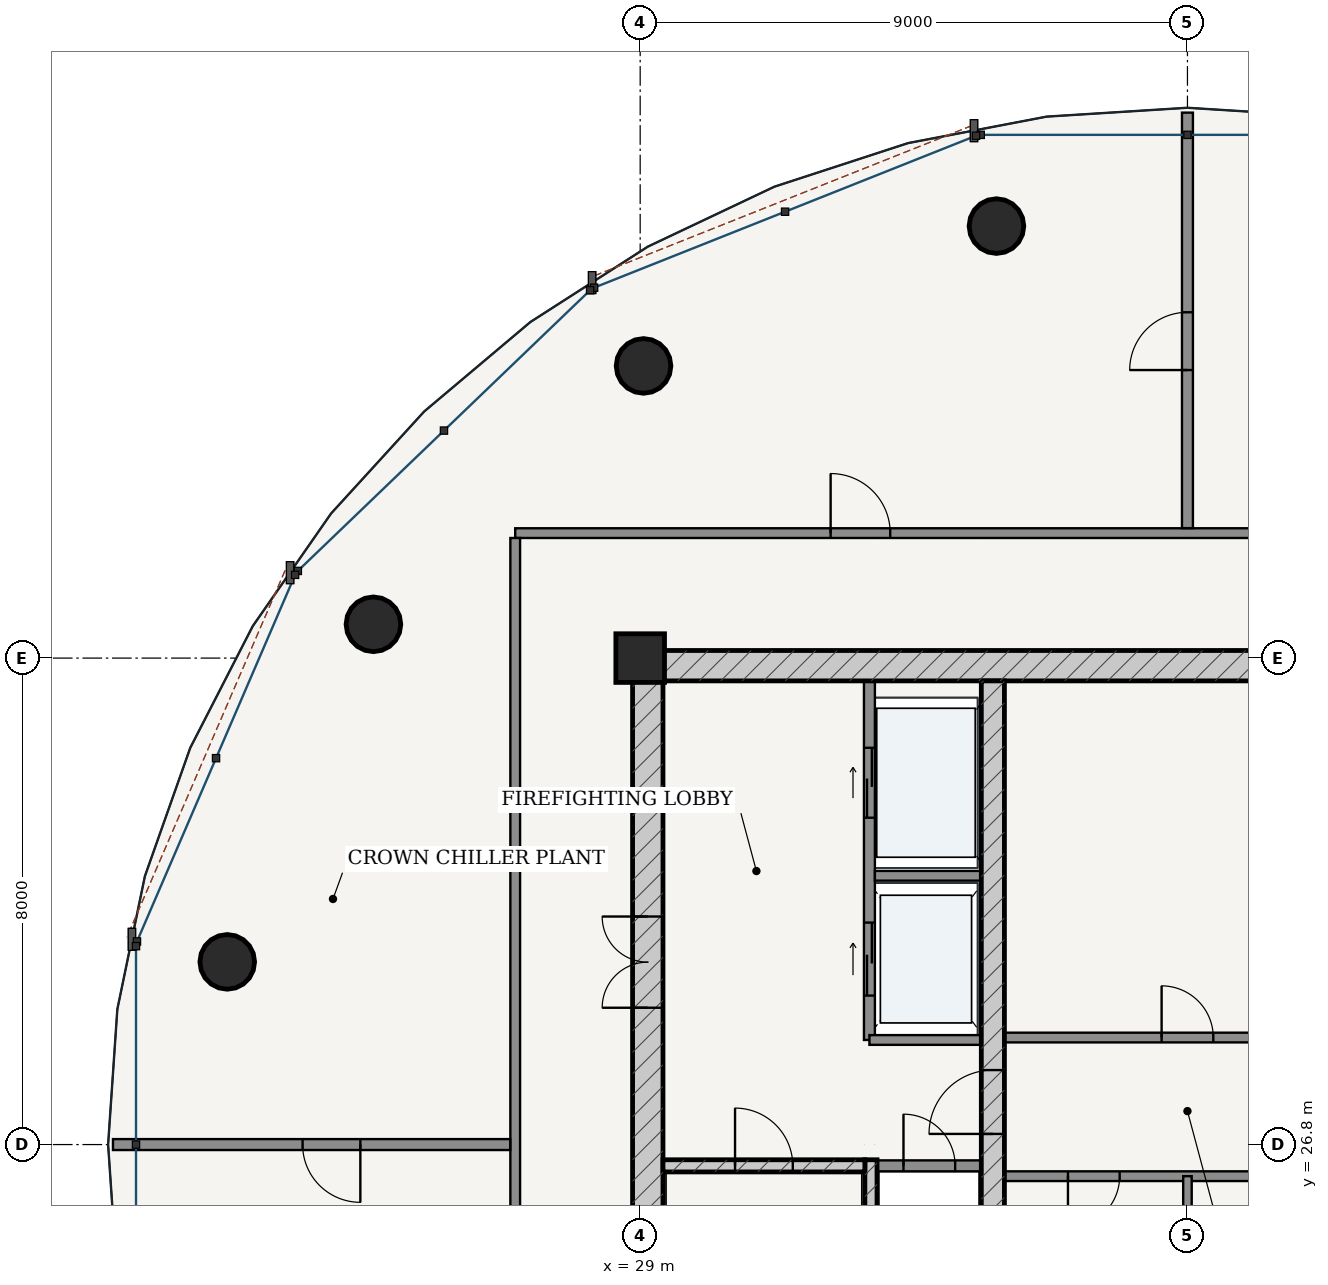
"""IFC4 building model, lengths in metres.
Left out: names, types, materials, properties, quantities, classifications, styles, units other than length and angle.
Written with IfcOpenShell. Run it as: python <this file> out.ifc"""

import sys

from ifc_helpers import new_model, si_unit, direction, frame, frame_2d, origin, origin_2d, place, context, subcontext, project, spatial, rectangle, hollow_circle, extrude, source, transform, mapped, element, fill, save


model = new_model("IFC4")
c1 = context("Model", 3, precision=1e-05, world=origin(), true_north=direction((-0.2419218956, 0.970295726276)))
c2 = subcontext(c1, "Body", "Model", "MODEL_VIEW")
j1 = project(units=[si_unit("LENGTHUNIT", "METRE"), si_unit("PLANEANGLEUNIT", "RADIAN")], contexts=[c1])
p1 = place(None, origin())
s1 = spatial("IfcSite", under=j1, at=p1, CompositionType="ELEMENT")
p2 = place(p1, origin())
s2 = spatial("IfcBuilding", under=s1, at=p2, CompositionType="ELEMENT")
p3 = place(p2, frame((0.0, 0.0, 311.3)))
s3 = spatial("IfcBuildingStorey", under=s2, at=p3, CompositionType="ELEMENT", Elevation=311.3)
p4 = place(p3, frame((29.0, 34.8, 0.0), z_axis=(0.0, 0.0, 1.0), x_axis=(1.0, 0.0, 0.0)))
e1 = element("IfcColumn", 1, at=p4, inside=s3, PredefinedType="COLUMN", context=c2, shape_type="SweptSolid", body=[
    extrude(rectangle(XDim=0.8, YDim=0.8, at=origin_2d()), origin(), (0.0, 0.0, 1.0), 5.2),
])
p5 = place(p3, frame((28.875, 34.675, 0.0), z_axis=(0.0, 0.0, 1.0), x_axis=(1.0, 0.0, 0.0)))
e2 = element("IfcWall", 2, at=p5, inside=s3, PredefinedType="SHEAR", context=c2, shape_type="SweptSolid", body=[
    extrude(rectangle(XDim=18.25, YDim=0.5, at=frame_2d((9.125, 0.0))), origin(), (0.0, 0.0, 1.0), 4.78),
])
p6 = place(p3, frame((29.125, 19.175, 0.0), z_axis=(0.0, 0.0, 1.0), x_axis=(0.0, 1.0, 0.0)))
e3 = element("IfcWall", 3, at=p6, inside=s3, PredefinedType="SHEAR", context=c2, shape_type="SweptSolid", body=[
    extrude(rectangle(XDim=15.25, YDim=0.5, at=frame_2d((7.625, 0.0))), origin(), (0.0, 0.0, 1.0), 4.78),
])
p7 = place(p6, frame((9.875, 0.0, 0.0)))
e4 = element("IfcOpeningElement", 4, at=p7, cuts=e3, PredefinedType="OPENING", context=c2, shape_type="SweptSolid", body=[
    extrude(rectangle(XDim=1.5, YDim=2.2, at=frame_2d((0.75, 1.1))), frame((0.0, 0.26, 0.0), z_axis=(0.0, -1.0, 0.0), x_axis=(1.0, 0.0, 0.0)), (0.0, 0.0, 1.0), 0.52),
])
p8 = place(p3, frame((32.795, 19.175, 0.0), z_axis=(0.0, 0.0, 1.0), x_axis=(0.0, 1.0, 0.0)))
e5 = element("IfcWall", 5, at=p8, inside=s3, PredefinedType="SOLIDWALL", context=c2, shape_type="SweptSolid", body=[
    extrude(rectangle(XDim=7.375, YDim=0.2, at=frame_2d((3.688, 0.0))), origin(), (0.0, 0.0, 1.0), 4.78),
])
p9 = place(p3, frame((29.375, 26.45, 0.0), z_axis=(0.0, 0.0, 1.0), x_axis=(1.0, 0.0, 0.0)))
e6 = element("IfcWall", 6, at=p9, inside=s3, PredefinedType="SOLIDWALL", context=c2, shape_type="SweptSolid", body=[
    extrude(rectangle(XDim=3.32, YDim=0.2, at=frame_2d((1.66, 0.0))), origin(), (0.0, 0.0, 1.0), 4.78),
])
p10 = place(p9, frame((1.185, 0.0, 0.0)))
e7 = element("IfcOpeningElement", 7, at=p10, cuts=e6, PredefinedType="OPENING", context=c2, shape_type="SweptSolid", body=[
    extrude(rectangle(XDim=0.95, YDim=2.15, at=frame_2d((0.475, 1.075))), frame((0.0, 0.11, 0.0), z_axis=(0.0, -1.0, 0.0), x_axis=(1.0, 0.0, 0.0)), (0.0, 0.0, 1.0), 0.22),
])
p11 = place(p3, frame((34.8, 19.175, 0.0), z_axis=(0.0, 0.0, 1.0), x_axis=(0.0, 1.0, 0.0)))
e8 = element("IfcWall", 8, at=p11, inside=s3, PredefinedType="SHEAR", context=c2, shape_type="SweptSolid", body=[
    extrude(rectangle(XDim=15.25, YDim=0.38, at=frame_2d((7.625, 0.0))), origin(), (0.0, 0.0, 1.0), 4.78),
])
p12 = place(p11, frame((7.8, 0.0, 0.0)))
e9 = element("IfcOpeningElement", 9, at=p12, cuts=e8, PredefinedType="OPENING", context=c2, shape_type="SweptSolid", body=[
    extrude(rectangle(XDim=1.05, YDim=2.15, at=frame_2d((0.525, 1.075))), frame((0.0, 0.2, 0.0), z_axis=(0.0, -1.0, 0.0), x_axis=(1.0, 0.0, 0.0)), (0.0, 0.0, 1.0), 0.4),
])
for number, where, z_axis, x_axis in (
    (10, (34.859, 41.904, 0.0), (0.0, 0.0, 1.0), (1.0, 0.0, 0.0)),
    (11, (29.055, 39.605, 0.0), (0.0, 0.0, 1.0), (1.0, 0.0, 0.0)),
    (12, (24.613, 35.356, 0.0), (0.0, 0.0, 1.0), (1.0, 0.0, 0.0)),
    (13, (22.209, 29.804, 0.0), (0.0, 0.0, 1.0), (1.0, 0.0, 0.0)),
):
    element("IfcColumn", number, at=place(p3, frame(where, z_axis=z_axis, x_axis=x_axis)), inside=s3, PredefinedType="COLUMN", context=c2, shape_type="SweptSolid", body=[
        extrude(hollow_circle(Radius=0.45, WallThickness=0.032, at=origin_2d()), origin(), (0.0, 0.0, 1.0), 5.2),
    ])
p13 = place(p3, frame((32.9, 26.45, 0.0), z_axis=(0.0, 0.0, 1.0), x_axis=(1.0, 0.0, 0.0)))
e14 = element("IfcWall", 14, at=p13, inside=s3, PredefinedType="PARTITIONING", context=c2, shape_type="SweptSolid", body=[
    extrude(rectangle(XDim=1.71, YDim=0.18, at=frame_2d((0.855, 0.0))), origin(), (0.0, 0.0, 1.0), 4.78),
])
p14 = place(p13, frame((0.43, 0.0, 0.0)))
e15 = element("IfcOpeningElement", 15, at=p14, cuts=e14, PredefinedType="OPENING", context=c2, shape_type="SweptSolid", body=[
    extrude(rectangle(XDim=0.85, YDim=2.1, at=frame_2d((0.425, 1.05))), frame((0.0, 0.1, 0.0), z_axis=(0.0, -1.0, 0.0), x_axis=(1.0, 0.0, 0.0)), (0.0, 0.0, 1.0), 0.2),
])
p15 = place(p3, frame((32.77, 28.52, 0.0), z_axis=(0.0, 0.0, 1.0), x_axis=(0.0, 1.0, 0.0)))
e16 = element("IfcWall", 16, at=p15, inside=s3, PredefinedType="PARTITIONING", context=c2, shape_type="SweptSolid", body=[
    extrude(rectangle(XDim=5.905, YDim=0.18, at=frame_2d((2.953, 0.0))), origin(), (0.0, 0.0, 1.0), 4.78),
])
p16 = place(p15, frame((3.655, 0.0, 0.0)))
e17 = element("IfcOpeningElement", 17, at=p16, cuts=e16, PredefinedType="OPENING", context=c2, shape_type="SweptSolid", body=[
    extrude(rectangle(XDim=1.15, YDim=2.2, at=frame_2d((0.575, 1.1))), frame((0.0, 0.1, 0.0), z_axis=(0.0, -1.0, 0.0), x_axis=(1.0, 0.0, 0.0)), (0.0, 0.0, 1.0), 0.2),
])
p17 = place(p15, frame((0.73, 0.0, 0.0)))
e18 = element("IfcOpeningElement", 18, at=p17, cuts=e16, PredefinedType="OPENING", context=c2, shape_type="SweptSolid", body=[
    extrude(rectangle(XDim=1.2, YDim=2.25, at=frame_2d((0.6, 1.125))), frame((0.0, 0.1, 0.0), z_axis=(0.0, -1.0, 0.0), x_axis=(1.0, 0.0, 0.0)), (0.0, 0.0, 1.0), 0.2),
])
p18 = place(p3, frame((32.86, 31.22, 0.0), z_axis=(0.0, 0.0, 1.0), x_axis=(1.0, 0.0, 0.0)))
e19 = element("IfcWall", 19, at=p18, inside=s3, PredefinedType="PARTITIONING", context=c2, shape_type="SweptSolid", body=[
    extrude(rectangle(XDim=1.75, YDim=0.16, at=frame_2d((0.875, 0.0))), origin(), (0.0, 0.0, 1.0), 4.78),
])
p19 = place(p3, frame((32.77, 28.52, 0.0), z_axis=(0.0, 0.0, 1.0), x_axis=(1.0, 0.0, 0.0)))
e20 = element("IfcWall", 20, at=p19, inside=s3, PredefinedType="PARTITIONING", context=c2, shape_type="SweptSolid", body=[
    extrude(rectangle(XDim=1.84, YDim=0.16, at=frame_2d((0.92, 0.0))), origin(), (0.0, 0.0, 1.0), 4.78),
])
p20 = place(p3, frame((34.99, 28.56, 0.0), z_axis=(0.0, 0.0, 1.0), x_axis=(1.0, 0.0, 0.0)))
e21 = element("IfcWall", 21, at=p20, inside=s3, PredefinedType="PARTITIONING", context=c2, shape_type="SweptSolid", body=[
    extrude(rectangle(XDim=6.02, YDim=0.16, at=frame_2d((3.01, 0.0))), origin(), (0.0, 0.0, 1.0), 4.78),
])
p21 = place(p20, frame((2.585, 0.0, 0.0)))
e22 = element("IfcOpeningElement", 22, at=p21, cuts=e21, PredefinedType="OPENING", context=c2, shape_type="SweptSolid", body=[
    extrude(rectangle(XDim=0.85, YDim=2.1, at=frame_2d((0.425, 1.05))), frame((0.0, 0.09, 0.0), z_axis=(0.0, -1.0, 0.0), x_axis=(1.0, 0.0, 0.0)), (0.0, 0.0, 1.0), 0.18),
])
p22 = place(p3, frame((34.99, 26.28, 0.0), z_axis=(0.0, 0.0, 1.0), x_axis=(1.0, 0.0, 0.0)))
e23 = element("IfcWall", 23, at=p22, inside=s3, PredefinedType="PARTITIONING", context=c2, shape_type="SweptSolid", body=[
    extrude(rectangle(XDim=6.02, YDim=0.16, at=frame_2d((3.01, 0.0))), origin(), (0.0, 0.0, 1.0), 4.78),
])
p23 = place(p22, frame((1.045, 0.0, 0.0)))
e24 = element("IfcOpeningElement", 24, at=p23, cuts=e23, PredefinedType="OPENING", context=c2, shape_type="SweptSolid", body=[
    extrude(rectangle(XDim=0.85, YDim=2.1, at=frame_2d((0.425, 1.05))), frame((0.0, 0.09, 0.0), z_axis=(0.0, -1.0, 0.0), x_axis=(1.0, 0.0, 0.0)), (0.0, 0.0, 1.0), 0.18),
])
p24 = place(p22, frame((4.125, 0.0, 0.0)))
e25 = element("IfcOpeningElement", 25, at=p24, cuts=e23, PredefinedType="OPENING", context=c2, shape_type="SweptSolid", body=[
    extrude(rectangle(XDim=0.85, YDim=2.1, at=frame_2d((0.425, 1.05))), frame((0.0, 0.09, 0.0), z_axis=(0.0, -1.0, 0.0), x_axis=(1.0, 0.0, 0.0)), (0.0, 0.0, 1.0), 0.18),
])
p25 = place(p3, frame((38.0, 23.72, 0.0), z_axis=(0.0, 0.0, 1.0), x_axis=(0.0, 1.0, 0.0)))
e26 = element("IfcWall", 26, at=p25, inside=s3, PredefinedType="PARTITIONING", context=c2, shape_type="SweptSolid", body=[
    extrude(rectangle(XDim=2.56, YDim=0.14, at=frame_2d((1.28, 0.0))), origin(), (0.0, 0.0, 1.0), 4.78),
])
p26 = place(p3, frame((26.945, 36.855, 0.0), z_axis=(0.0, 0.0, 1.0), x_axis=(1.0, 0.0, 0.0)))
e27 = element("IfcWall", 27, at=p26, inside=s3, PredefinedType="PARTITIONING", context=c2, shape_type="SweptSolid", body=[
    extrude(rectangle(XDim=22.11, YDim=0.16, at=frame_2d((11.055, 0.0))), origin(), (0.0, 0.0, 1.0), 4.352),
])
p27 = place(p26, frame((15.943, 0.0, 0.0)))
e28 = element("IfcOpeningElement", 28, at=p27, cuts=e27, PredefinedType="OPENING", context=c2, shape_type="SweptSolid", body=[
    extrude(rectangle(XDim=0.98, YDim=2.2, at=frame_2d((0.49, 1.1))), frame((0.0, 0.09, 0.0), z_axis=(0.0, -1.0, 0.0), x_axis=(1.0, 0.0, 0.0)), (0.0, 0.0, 1.0), 0.18),
])
p28 = place(p26, frame((5.187, 0.0, 0.0)))
e29 = element("IfcOpeningElement", 29, at=p28, cuts=e27, PredefinedType="OPENING", context=c2, shape_type="SweptSolid", body=[
    extrude(rectangle(XDim=0.98, YDim=2.2, at=frame_2d((0.49, 1.1))), frame((0.0, 0.09, 0.0), z_axis=(0.0, -1.0, 0.0), x_axis=(1.0, 0.0, 0.0)), (0.0, 0.0, 1.0), 0.18),
])
p29 = place(p3, frame((26.945, 16.825, 0.0), z_axis=(0.0, 0.0, 1.0), x_axis=(0.0, 1.0, 0.0)))
e30 = element("IfcWall", 30, at=p29, inside=s3, PredefinedType="PARTITIONING", context=c2, shape_type="SweptSolid", body=[
    extrude(rectangle(XDim=19.95, YDim=0.16, at=frame_2d((9.975, 0.0))), origin(), (0.0, 0.0, 1.0), 4.352),
])
p30 = place(p3, frame((38.0, 36.937, 0.0), z_axis=(0.0, 0.0, 1.0), x_axis=(0.0, 1.0, 0.0)))
e31 = element("IfcWall", 31, at=p30, inside=s3, PredefinedType="PARTITIONING", context=c2, shape_type="SweptSolid", body=[
    extrude(rectangle(XDim=6.833, YDim=0.18, at=frame_2d((3.417, 0.0))), origin(), (0.0, 0.0, 1.0), 4.411),
])
p31 = place(p30, frame((2.6, 0.0, 0.0)))
e32 = element("IfcOpeningElement", 32, at=p31, cuts=e31, PredefinedType="OPENING", context=c2, shape_type="SweptSolid", body=[
    extrude(rectangle(XDim=0.95, YDim=2.15, at=frame_2d((0.475, 1.075))), frame((0.0, 0.1, 0.0), z_axis=(0.0, -1.0, 0.0), x_axis=(1.0, 0.0, 0.0)), (0.0, 0.0, 1.0), 0.2),
])
p32 = place(p3, frame((26.863, 26.8, 0.0), z_axis=(0.0, 0.0, 1.0), x_axis=(-1.0, 0.0, 0.0)))
e33 = element("IfcWall", 33, at=p32, inside=s3, PredefinedType="PARTITIONING", context=c2, shape_type="SweptSolid", body=[
    extrude(rectangle(XDim=6.533, YDim=0.18, at=frame_2d((3.267, 0.0))), origin(), (0.0, 0.0, 1.0), 4.411),
])
p33 = place(p32, frame((2.465, 0.0, 0.0)))
e34 = element("IfcOpeningElement", 34, at=p33, cuts=e33, PredefinedType="OPENING", context=c2, shape_type="SweptSolid", body=[
    extrude(rectangle(XDim=0.95, YDim=2.15, at=frame_2d((0.475, 1.075))), frame((0.0, 0.1, 0.0), z_axis=(0.0, -1.0, 0.0), x_axis=(1.0, 0.0, 0.0)), (0.0, 0.0, 1.0), 0.2),
])
m1 = source(origin(), c2, "Body", "SweptSolid", [
    extrude(rectangle(XDim=1.5, YDim=2.2, at=frame_2d((0.75, 1.1))), frame((0.0, 0.025, 0.0), z_axis=(0.0, -1.0, 0.0), x_axis=(1.0, 0.0, 0.0)), (0.0, 0.0, 1.0), 0.05),
])
p34 = place(p7, origin())
e35 = element("IfcDoor", 35, at=p34, inside=s3, OperationType="DOUBLE_DOOR_SINGLE_SWING", PredefinedType="DOOR", context=c2, shape_type="MappedRepresentation", body=[
    mapped(m1, transform((0.0, 0.0, 0.0), scale=1.0)),
])
fill(e4, e35)
m2 = source(origin(), c2, "Body", "SweptSolid", [
    extrude(rectangle(XDim=1.05, YDim=2.15, at=frame_2d((0.525, 1.075))), frame((0.0, 0.025, 0.0), z_axis=(0.0, -1.0, 0.0), x_axis=(1.0, 0.0, 0.0)), (0.0, 0.0, 1.0), 0.05),
])
p35 = place(p12, origin())
e36 = element("IfcDoor", 36, at=p35, inside=s3, OperationType="SINGLE_SWING_LEFT", PredefinedType="DOOR", context=c2, shape_type="MappedRepresentation", body=[
    mapped(m2, transform((0.0, 0.0, 0.0), scale=1.0)),
])
fill(e9, e36)
m3 = source(origin(), c2, "Body", "SweptSolid", [
    extrude(rectangle(XDim=0.95, YDim=2.15, at=frame_2d((0.475, 1.075))), frame((0.0, 0.025, 0.0), z_axis=(0.0, -1.0, 0.0), x_axis=(1.0, 0.0, 0.0)), (0.0, 0.0, 1.0), 0.05),
])
p36 = place(p10, origin())
e37 = element("IfcDoor", 37, at=p36, inside=s3, OperationType="SINGLE_SWING_LEFT", PredefinedType="DOOR", context=c2, shape_type="MappedRepresentation", body=[
    mapped(m3, transform((0.0, 0.0, 0.0), scale=1.0)),
])
fill(e7, e37)
m4 = source(origin(), c2, "Body", "SweptSolid", [
    extrude(rectangle(XDim=0.85, YDim=2.1, at=frame_2d((0.425, 1.05))), frame((0.0, 0.025, 0.0), z_axis=(0.0, -1.0, 0.0), x_axis=(1.0, 0.0, 0.0)), (0.0, 0.0, 1.0), 0.05),
])
p37 = place(p14, origin())
e38 = element("IfcDoor", 38, at=p37, inside=s3, OperationType="SINGLE_SWING_LEFT", PredefinedType="DOOR", context=c2, shape_type="MappedRepresentation", body=[
    mapped(m4, transform((0.0, 0.0, 0.0), scale=1.0)),
])
fill(e15, e38)
p38 = place(p21, origin())
e39 = element("IfcDoor", 39, at=p38, inside=s3, OperationType="SINGLE_SWING_LEFT", PredefinedType="DOOR", context=c2, shape_type="MappedRepresentation", body=[
    mapped(m4, transform((0.0, 0.0, 0.0), scale=1.0)),
])
fill(e22, e39)
p39 = place(p23, frame((0.85, 0.0, 0.0), z_axis=(0.0, 0.0, 1.0), x_axis=(-1.0, 0.0, 0.0)))
e40 = element("IfcDoor", 40, at=p39, inside=s3, OperationType="SINGLE_SWING_RIGHT", PredefinedType="DOOR", context=c2, shape_type="MappedRepresentation", body=[
    mapped(m4, transform((0.0, 0.0, 0.0), scale=1.0)),
])
fill(e24, e40)
m5 = source(origin(), c2, "Body", "SweptSolid", [
    extrude(rectangle(XDim=1.15, YDim=2.2, at=frame_2d((0.575, 1.1))), frame((0.0, 0.025, 0.0), z_axis=(0.0, -1.0, 0.0), x_axis=(1.0, 0.0, 0.0)), (0.0, 0.0, 1.0), 0.05),
])
p40 = place(p16, origin())
e41 = element("IfcDoor", 41, at=p40, inside=s3, OperationType="DOUBLE_DOOR_SLIDING", PredefinedType="DOOR", context=c2, shape_type="MappedRepresentation", body=[
    mapped(m5, transform((0.0, 0.0, 0.0), scale=1.0)),
])
fill(e17, e41)
m6 = source(origin(), c2, "Body", "SweptSolid", [
    extrude(rectangle(XDim=1.2, YDim=2.25, at=frame_2d((0.6, 1.125))), frame((0.0, 0.025, 0.0), z_axis=(0.0, -1.0, 0.0), x_axis=(1.0, 0.0, 0.0)), (0.0, 0.0, 1.0), 0.05),
])
p41 = place(p17, origin())
e42 = element("IfcDoor", 42, at=p41, inside=s3, OperationType="DOUBLE_DOOR_SLIDING", PredefinedType="DOOR", context=c2, shape_type="MappedRepresentation", body=[
    mapped(m6, transform((0.0, 0.0, 0.0), scale=1.0)),
])
fill(e18, e42)
m7 = source(origin(), c2, "Body", "SweptSolid", [
    extrude(rectangle(XDim=0.98, YDim=2.2, at=frame_2d((0.49, 1.1))), frame((0.0, 0.025, 0.0), z_axis=(0.0, -1.0, 0.0), x_axis=(1.0, 0.0, 0.0)), (0.0, 0.0, 1.0), 0.05),
])
p42 = place(p28, origin())
e43 = element("IfcDoor", 43, at=p42, inside=s3, OperationType="SINGLE_SWING_LEFT", PredefinedType="DOOR", context=c2, shape_type="MappedRepresentation", body=[
    mapped(m7, transform((0.0, 0.0, 0.0), scale=1.0)),
])
fill(e29, e43)
p43 = place(p31, origin())
e44 = element("IfcDoor", 44, at=p43, inside=s3, OperationType="SINGLE_SWING_LEFT", PredefinedType="DOOR", context=c2, shape_type="MappedRepresentation", body=[
    mapped(m3, transform((0.0, 0.0, 0.0), scale=1.0)),
])
fill(e32, e44)
p44 = place(p33, origin())
e45 = element("IfcDoor", 45, at=p44, inside=s3, OperationType="SINGLE_SWING_LEFT", PredefinedType="DOOR", context=c2, shape_type="MappedRepresentation", body=[
    mapped(m3, transform((0.0, 0.0, 0.0), scale=1.0)),
])
fill(e34, e45)
save(model, sys.argv[1])
